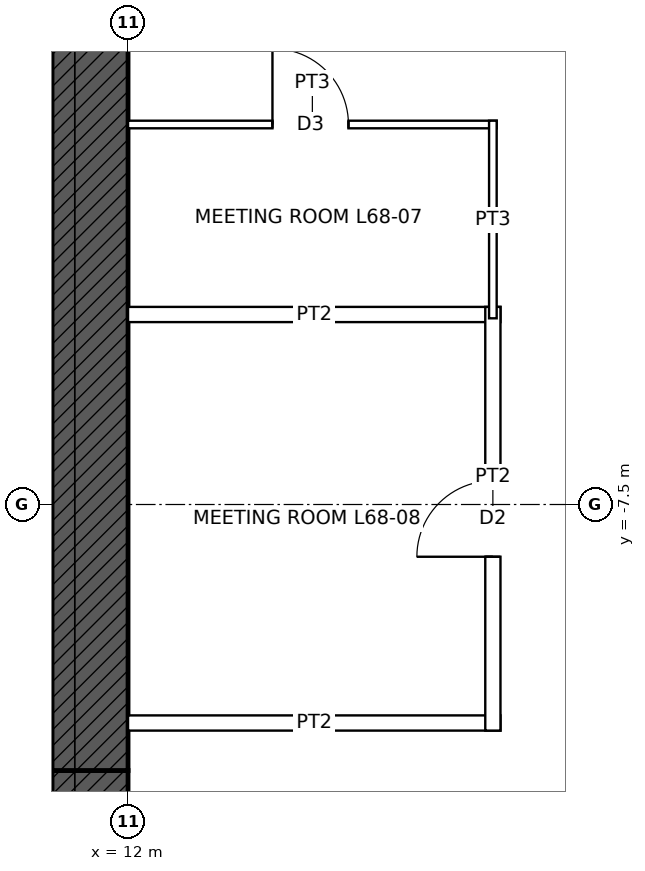
"""IFC4 building model, lengths in metres.
Left out: names, types, materials, properties, quantities, classifications, styles, units other than length and angle.
Written with IfcOpenShell. Run it as: python <this file> out.ifc"""

import sys

from ifc_helpers import new_model, si_unit, direction, frame, frame_2d, origin, place, context, subcontext, project, spatial, rectangle, extrude, element, fill, save


model = new_model("IFC4")
c1 = context("Model", 3, precision=1e-05, world=origin(), true_north=direction((0.0, 1.0)))
c2 = subcontext(c1, "Body", "Model", "MODEL_VIEW")
j1 = project(units=[si_unit("LENGTHUNIT", "METRE"), si_unit("PLANEANGLEUNIT", "RADIAN")], contexts=[c1])
p1 = place(None, origin())
s1 = spatial("IfcSite", under=j1, at=p1, CompositionType="ELEMENT")
p2 = place(p1, origin())
s2 = spatial("IfcBuilding", under=s1, at=p2, CompositionType="ELEMENT")
p3 = place(p2, frame((0.0, 0.0, 307.9)))
s3 = spatial("IfcBuildingStorey", under=s2, at=p3, CompositionType="ELEMENT", Elevation=307.9)
p4 = place(p3, frame((12.0, -11.5, 0.0), z_axis=(0.0, 0.0, 1.0), x_axis=(-1.0, 0.0, 0.0)))
e1 = element("IfcWall", 1, at=p4, inside=s3, PredefinedType="SHEAR", context=c2, shape_type="SweptSolid", body=[
    extrude(rectangle(XDim=24.0, YDim=1.0, at=frame_2d((12.0, 0.0))), origin(), (0.0, 0.0, 1.0), 4.0),
])
p5 = place(p4, frame((11.5, 0.0, 0.0)))
e2 = element("IfcOpeningElement", 2, at=p5, cuts=e1, PredefinedType="OPENING", context=c2, shape_type="SweptSolid", body=[
    extrude(rectangle(XDim=1.0, YDim=2.1, at=frame_2d((0.5, 1.05))), frame((0.0, 0.51, 0.0), z_axis=(0.0, -1.0, 0.0), x_axis=(1.0, 0.0, 0.0)), (0.0, 0.0, 1.0), 1.02),
])
p6 = place(p4, frame((1.0, 0.0, 0.0)))
e3 = element("IfcOpeningElement", 3, at=p6, cuts=e1, PredefinedType="OPENING", context=c2, shape_type="SweptSolid", body=[
    extrude(rectangle(XDim=1.0, YDim=2.4, at=frame_2d((0.5, 1.2))), frame((0.0, 0.51, 0.0), z_axis=(0.0, -1.0, 0.0), x_axis=(1.0, 0.0, 0.0)), (0.0, 0.0, 1.0), 1.02),
])
p7 = place(p3, frame((11.5, 11.0, 0.0), z_axis=(0.0, 0.0, 1.0), x_axis=(0.0, -1.0, 0.0)))
e4 = element("IfcWall", 4, at=p7, inside=s3, PredefinedType="SHEAR", context=c2, shape_type="SweptSolid", body=[
    extrude(rectangle(XDim=22.0, YDim=1.0, at=frame_2d((11.0, 0.0))), origin(), (0.0, 0.0, 1.0), 4.0),
])
p8 = place(p7, frame((10.5, 0.0, 0.0)))
e5 = element("IfcOpeningElement", 5, at=p8, cuts=e4, PredefinedType="OPENING", context=c2, shape_type="SweptSolid", body=[
    extrude(rectangle(XDim=1.0, YDim=2.4, at=frame_2d((0.5, 1.2))), frame((0.0, 0.51, 0.0), z_axis=(0.0, -1.0, 0.0), x_axis=(1.0, 0.0, 0.0)), (0.0, 0.0, 1.0), 1.02),
])
for number, where, z_axis, x_axis in (
    (6, (12.0, -10.375, 0.0), (0.0, 0.0, 1.0), (1.0, 0.0, 0.0)),
    (7, (12.0, -5.0, 0.0), (0.0, 0.0, 1.0), (1.0, 0.0, 0.0)),
):
    element("IfcWall", number, at=place(p3, frame(where, z_axis=z_axis, x_axis=x_axis)), inside=s3, PredefinedType="PARTITIONING", context=c2, shape_type="SweptSolid", body=[
        extrude(rectangle(XDim=4.9, YDim=0.2, at=frame_2d((2.45, 0.0))), origin(), (0.0, 0.0, 1.0), 3.85),
    ])
p9 = place(p3, frame((12.0, -2.5, 0.0), z_axis=(0.0, 0.0, 1.0), x_axis=(1.0, 0.0, 0.0)))
e8 = element("IfcWall", 8, at=p9, inside=s3, PredefinedType="PARTITIONING", context=c2, shape_type="SweptSolid", body=[
    extrude(rectangle(XDim=4.85, YDim=0.1, at=frame_2d((2.425, 0.0))), origin(), (0.0, 0.0, 1.0), 3.85),
])
p10 = place(p9, frame((1.9, 0.0, 0.0)))
e9 = element("IfcOpeningElement", 9, at=p10, cuts=e8, PredefinedType="OPENING", context=c2, shape_type="SweptSolid", body=[
    extrude(rectangle(XDim=1.0, YDim=2.1, at=frame_2d((0.5, 1.05))), frame((0.0, 0.06, 0.0), z_axis=(0.0, -1.0, 0.0), x_axis=(1.0, 0.0, 0.0)), (0.0, 0.0, 1.0), 0.12),
])
p11 = place(p3, frame((16.8, -10.475, 0.0), z_axis=(0.0, 0.0, 1.0), x_axis=(0.0, 1.0, 0.0)))
e10 = element("IfcWall", 10, at=p11, inside=s3, PredefinedType="PARTITIONING", context=c2, shape_type="SweptSolid", body=[
    extrude(rectangle(XDim=5.575, YDim=0.2, at=frame_2d((2.788, 0.0))), origin(), (0.0, 0.0, 1.0), 3.85),
])
p12 = place(p11, frame((2.288, 0.0, 0.0)))
e11 = element("IfcOpeningElement", 11, at=p12, cuts=e10, PredefinedType="OPENING", context=c2, shape_type="SweptSolid", body=[
    extrude(rectangle(XDim=1.0, YDim=2.1, at=frame_2d((0.5, 1.05))), frame((0.0, 0.11, 0.0), z_axis=(0.0, -1.0, 0.0), x_axis=(1.0, 0.0, 0.0)), (0.0, 0.0, 1.0), 0.22),
])
p13 = place(p3, frame((16.8, -5.05, 0.0), z_axis=(0.0, 0.0, 1.0), x_axis=(0.0, 1.0, 0.0)))
e12 = element("IfcWall", 12, at=p13, inside=s3, PredefinedType="PARTITIONING", context=c2, shape_type="SweptSolid", body=[
    extrude(rectangle(XDim=2.6, YDim=0.1, at=frame_2d((1.3, 0.0))), origin(), (0.0, 0.0, 1.0), 3.85),
])
p14 = place(p10, origin())
e13 = element("IfcDoor", 13, at=p14, inside=s3, OperationType="SINGLE_SWING_LEFT", PredefinedType="DOOR", context=c2, shape_type="SweptSolid", body=[
    extrude(rectangle(XDim=1.0, YDim=2.1, at=frame_2d((0.5, 1.05))), frame((0.0, 0.025, 0.0), z_axis=(0.0, -1.0, 0.0), x_axis=(1.0, 0.0, 0.0)), (0.0, 0.0, 1.0), 0.05),
])
fill(e9, e13)
p15 = place(p12, origin())
e14 = element("IfcDoor", 14, at=p15, inside=s3, OperationType="SINGLE_SWING_LEFT", PredefinedType="DOOR", context=c2, shape_type="SweptSolid", body=[
    extrude(rectangle(XDim=1.0, YDim=2.1, at=frame_2d((0.5, 1.05))), frame((0.0, 0.025, 0.0), z_axis=(0.0, -1.0, 0.0), x_axis=(1.0, 0.0, 0.0)), (0.0, 0.0, 1.0), 0.05),
])
fill(e11, e14)
save(model, sys.argv[1])
